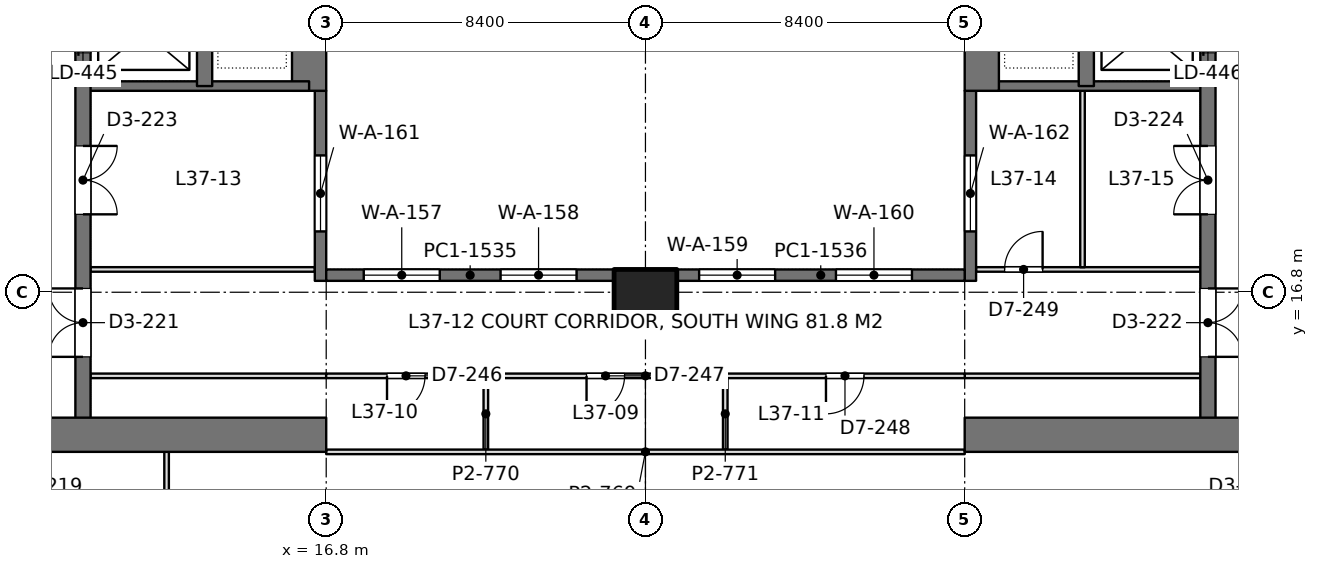
"""IFC4 building model, lengths in metres.
Left out: names, types, materials, properties, quantities, classifications, styles, units other than length and angle.
Written with IfcOpenShell. Run it as: python <this file> out.ifc"""

import sys

from ifc_helpers import new_model, si_unit, direction, frame, frame_2d, origin, origin_2d, place, context, subcontext, project, spatial, rectangle, extrude, element, fill, save


model = new_model("IFC4")
c1 = context("Model", 3, precision=1e-05, world=origin(), true_north=direction((0.0, 1.0)))
c2 = subcontext(c1, "Body", "Model", "MODEL_VIEW")
j1 = project(units=[si_unit("LENGTHUNIT", "METRE"), si_unit("PLANEANGLEUNIT", "RADIAN")], contexts=[c1])
p1 = place(None, origin())
s1 = spatial("IfcSite", under=j1, at=p1, CompositionType="ELEMENT")
p2 = place(p1, origin())
s2 = spatial("IfcBuilding", under=s1, at=p2, CompositionType="ELEMENT")
p3 = place(p2, frame((0.0, 0.0, 163.8)))
s3 = spatial("IfcBuildingStorey", under=s2, at=p3, CompositionType="ELEMENT", Elevation=163.8)
p4 = place(p3, frame((25.2, 16.8, 0.0), z_axis=(0.0, 0.0, 1.0), x_axis=(1.0, 0.0, 0.0)))
e1 = element("IfcColumn", 1, at=p4, inside=s3, PredefinedType="COLUMN", context=c2, shape_type="SweptSolid", body=[
    extrude(rectangle(XDim=1.65, YDim=1.2, at=origin_2d()), origin(), (0.0, 0.0, 1.0), 4.2),
])
p5 = place(p3, frame((-1.2, 13.05, 0.0), z_axis=(0.0, 0.0, 1.0), x_axis=(1.0, 0.0, 0.0)))
e2 = element("IfcWall", 2, at=p5, inside=s3, PredefinedType="SHEAR", context=c2, shape_type="SweptSolid", body=[
    extrude(rectangle(XDim=18.0, YDim=0.9, at=frame_2d((9.0, 0.0))), origin(), (0.0, 0.0, 1.0), 4.2),
])
p6 = place(p5, frame((8.95, 0.0, 0.0)))
e3 = element("IfcOpeningElement", 3, at=p6, cuts=e2, PredefinedType="OPENING", context=c2, shape_type="SweptSolid", body=[
    extrude(rectangle(XDim=1.8, YDim=2.4, at=frame_2d((0.9, 1.2))), frame((0.0, 0.46, 0.0), z_axis=(0.0, -1.0, 0.0), x_axis=(1.0, 0.0, 0.0)), (0.0, 0.0, 1.0), 0.92),
])
p7 = place(p3, frame((16.35, 22.1, 0.0), z_axis=(0.0, 0.0, 1.0), x_axis=(0.0, 1.0, 0.0)))
e4 = element("IfcWall", 4, at=p7, inside=s3, PredefinedType="SHEAR", context=c2, shape_type="SweptSolid", body=[
    extrude(rectangle(XDim=15.25, YDim=0.9, at=frame_2d((7.625, 0.0))), origin(), (0.0, 0.0, 1.0), 4.2),
])
p8 = place(p3, frame((10.4, 13.05, 0.0), z_axis=(0.0, 0.0, 1.0), x_axis=(0.0, 1.0, 0.0)))
e5 = element("IfcWall", 5, at=p8, inside=s3, PredefinedType="SHEAR", context=c2, shape_type="SweptSolid", body=[
    extrude(rectangle(XDim=24.3, YDim=0.4, at=frame_2d((12.15, 0.0))), origin(), (0.0, 0.0, 1.0), 4.2),
])
p9 = place(p8, frame((10.05, 0.0, 0.0)))
e6 = element("IfcOpeningElement", 6, at=p9, cuts=e5, PredefinedType="OPENING", context=c2, shape_type="SweptSolid", body=[
    extrude(rectangle(XDim=1.1, YDim=2.2, at=frame_2d((0.55, 1.1))), frame((0.0, 0.21, 0.0), z_axis=(0.0, -1.0, 0.0), x_axis=(1.0, 0.0, 0.0)), (0.0, 0.0, 1.0), 0.42),
])
p10 = place(p8, frame((12.9, 0.0, 0.0)))
e7 = element("IfcOpeningElement", 7, at=p10, cuts=e5, PredefinedType="OPENING", context=c2, shape_type="SweptSolid", body=[
    extrude(rectangle(XDim=1.1, YDim=2.2, at=frame_2d((0.55, 1.1))), frame((0.0, 0.21, 0.0), z_axis=(0.0, -1.0, 0.0), x_axis=(1.0, 0.0, 0.0)), (0.0, 0.0, 1.0), 0.42),
])
p11 = place(p8, frame((21.45, 0.0, 0.0)))
e8 = element("IfcOpeningElement", 8, at=p11, cuts=e5, PredefinedType="OPENING", context=c2, shape_type="SweptSolid", body=[
    extrude(rectangle(XDim=1.1, YDim=2.2, at=frame_2d((0.55, 1.1))), frame((0.0, 0.21, 0.0), z_axis=(0.0, -1.0, 0.0), x_axis=(1.0, 0.0, 0.0)), (0.0, 0.0, 1.0), 0.42),
])
p12 = place(p8, frame((2.05, 0.0, 0.0)))
e9 = element("IfcOpeningElement", 9, at=p12, cuts=e5, PredefinedType="OPENING", context=c2, shape_type="SweptSolid", body=[
    extrude(rectangle(XDim=1.8, YDim=2.4, at=frame_2d((0.9, 1.2))), frame((0.0, 0.21, 0.0), z_axis=(0.0, -1.0, 0.0), x_axis=(1.0, 0.0, 0.0)), (0.0, 0.0, 1.0), 0.42),
])
p13 = place(p8, frame((5.8, 0.0, 0.0)))
e10 = element("IfcOpeningElement", 10, at=p13, cuts=e5, PredefinedType="OPENING", context=c2, shape_type="SweptSolid", body=[
    extrude(rectangle(XDim=1.8, YDim=2.4, at=frame_2d((0.9, 1.2))), frame((0.0, 0.21, 0.0), z_axis=(0.0, -1.0, 0.0), x_axis=(1.0, 0.0, 0.0)), (0.0, 0.0, 1.0), 0.42),
])
p14 = place(p3, frame((13.6, 22.225, 0.0), z_axis=(0.0, 0.0, 1.0), x_axis=(0.0, 1.0, 0.0)))
e11 = element("IfcWall", 11, at=p14, inside=s3, PredefinedType="SHEAR", context=c2, shape_type="SweptSolid", body=[
    extrude(rectangle(XDim=15.125, YDim=0.4, at=frame_2d((7.562, 0.0))), origin(), (0.0, 0.0, 1.0), 4.2),
])
p15 = place(p3, frame((10.4, 22.225, 0.0), z_axis=(0.0, 0.0, 1.0), x_axis=(1.0, 0.0, 0.0)))
e12 = element("IfcWall", 12, at=p15, inside=s3, PredefinedType="SHEAR", context=c2, shape_type="SweptSolid", body=[
    extrude(rectangle(XDim=5.95, YDim=0.25, at=frame_2d((2.975, 0.0))), origin(), (0.0, 0.0, 1.0), 4.2),
])
p16 = place(p3, frame((33.6, 13.05, 0.0), z_axis=(0.0, 0.0, 1.0), x_axis=(1.0, 0.0, 0.0)))
e13 = element("IfcWall", 13, at=p16, inside=s3, PredefinedType="SHEAR", context=c2, shape_type="SweptSolid", body=[
    extrude(rectangle(XDim=18.0, YDim=0.9, at=frame_2d((9.0, 0.0))), origin(), (0.0, 0.0, 1.0), 4.2),
])
p17 = place(p16, frame((7.25, 0.0, 0.0)))
e14 = element("IfcOpeningElement", 14, at=p17, cuts=e13, PredefinedType="OPENING", context=c2, shape_type="SweptSolid", body=[
    extrude(rectangle(XDim=1.8, YDim=2.4, at=frame_2d((0.9, 1.2))), frame((0.0, 0.46, 0.0), z_axis=(0.0, -1.0, 0.0), x_axis=(1.0, 0.0, 0.0)), (0.0, 0.0, 1.0), 0.92),
])
p18 = place(p3, frame((34.05, 22.1, 0.0), z_axis=(0.0, 0.0, 1.0), x_axis=(0.0, 1.0, 0.0)))
e15 = element("IfcWall", 15, at=p18, inside=s3, PredefinedType="SHEAR", context=c2, shape_type="SweptSolid", body=[
    extrude(rectangle(XDim=15.25, YDim=0.9, at=frame_2d((7.625, 0.0))), origin(), (0.0, 0.0, 1.0), 4.2),
])
p19 = place(p3, frame((40.0, 13.05, 0.0), z_axis=(0.0, 0.0, 1.0), x_axis=(0.0, 1.0, 0.0)))
e16 = element("IfcWall", 16, at=p19, inside=s3, PredefinedType="SHEAR", context=c2, shape_type="SweptSolid", body=[
    extrude(rectangle(XDim=24.3, YDim=0.4, at=frame_2d((12.15, 0.0))), origin(), (0.0, 0.0, 1.0), 4.2),
])
p20 = place(p19, frame((10.05, 0.0, 0.0)))
e17 = element("IfcOpeningElement", 17, at=p20, cuts=e16, PredefinedType="OPENING", context=c2, shape_type="SweptSolid", body=[
    extrude(rectangle(XDim=1.1, YDim=2.2, at=frame_2d((0.55, 1.1))), frame((0.0, 0.21, 0.0), z_axis=(0.0, -1.0, 0.0), x_axis=(1.0, 0.0, 0.0)), (0.0, 0.0, 1.0), 0.42),
])
p21 = place(p19, frame((12.9, 0.0, 0.0)))
e18 = element("IfcOpeningElement", 18, at=p21, cuts=e16, PredefinedType="OPENING", context=c2, shape_type="SweptSolid", body=[
    extrude(rectangle(XDim=1.1, YDim=2.2, at=frame_2d((0.55, 1.1))), frame((0.0, 0.21, 0.0), z_axis=(0.0, -1.0, 0.0), x_axis=(1.0, 0.0, 0.0)), (0.0, 0.0, 1.0), 0.42),
])
p22 = place(p19, frame((21.45, 0.0, 0.0)))
e19 = element("IfcOpeningElement", 19, at=p22, cuts=e16, PredefinedType="OPENING", context=c2, shape_type="SweptSolid", body=[
    extrude(rectangle(XDim=1.1, YDim=2.2, at=frame_2d((0.55, 1.1))), frame((0.0, 0.21, 0.0), z_axis=(0.0, -1.0, 0.0), x_axis=(1.0, 0.0, 0.0)), (0.0, 0.0, 1.0), 0.42),
])
p23 = place(p19, frame((2.05, 0.0, 0.0)))
e20 = element("IfcOpeningElement", 20, at=p23, cuts=e16, PredefinedType="OPENING", context=c2, shape_type="SweptSolid", body=[
    extrude(rectangle(XDim=1.8, YDim=2.4, at=frame_2d((0.9, 1.2))), frame((0.0, 0.21, 0.0), z_axis=(0.0, -1.0, 0.0), x_axis=(1.0, 0.0, 0.0)), (0.0, 0.0, 1.0), 0.42),
])
p24 = place(p19, frame((5.8, 0.0, 0.0)))
e21 = element("IfcOpeningElement", 21, at=p24, cuts=e16, PredefinedType="OPENING", context=c2, shape_type="SweptSolid", body=[
    extrude(rectangle(XDim=1.8, YDim=2.4, at=frame_2d((0.9, 1.2))), frame((0.0, 0.21, 0.0), z_axis=(0.0, -1.0, 0.0), x_axis=(1.0, 0.0, 0.0)), (0.0, 0.0, 1.0), 0.42),
])
p25 = place(p3, frame((36.8, 22.225, 0.0), z_axis=(0.0, 0.0, 1.0), x_axis=(0.0, 1.0, 0.0)))
e22 = element("IfcWall", 22, at=p25, inside=s3, PredefinedType="SHEAR", context=c2, shape_type="SweptSolid", body=[
    extrude(rectangle(XDim=15.125, YDim=0.4, at=frame_2d((7.562, 0.0))), origin(), (0.0, 0.0, 1.0), 4.2),
])
p26 = place(p3, frame((40.0, 22.225, 0.0), z_axis=(0.0, 0.0, 1.0), x_axis=(-1.0, 0.0, 0.0)))
e23 = element("IfcWall", 23, at=p26, inside=s3, PredefinedType="SHEAR", context=c2, shape_type="SweptSolid", body=[
    extrude(rectangle(XDim=5.95, YDim=0.25, at=frame_2d((2.975, 0.0))), origin(), (0.0, 0.0, 1.0), 4.2),
])
p27 = place(p3, frame((16.65, 17.1, 0.0), z_axis=(0.0, 0.0, 1.0), x_axis=(0.0, 1.0, 0.0)))
e24 = element("IfcWall", 24, at=p27, inside=s3, PredefinedType="SOLIDWALL", context=c2, shape_type="SweptSolid", body=[
    extrude(rectangle(XDim=5.0, YDim=0.3, at=frame_2d((2.5, 0.0))), origin(), (0.0, 0.0, 1.0), 4.0),
])
p28 = place(p27, frame((1.3, 0.0, 0.1)))
e25 = element("IfcOpeningElement", 25, at=p28, cuts=e24, PredefinedType="OPENING", context=c2, shape_type="SweptSolid", body=[
    extrude(rectangle(XDim=2.0, YDim=3.0, at=frame_2d((1.0, 1.5))), frame((0.0, 0.16, 0.0), z_axis=(0.0, -1.0, 0.0), x_axis=(1.0, 0.0, 0.0)), (0.0, 0.0, 1.0), 0.32),
])
p29 = place(p3, frame((33.75, 17.1, 0.0), z_axis=(0.0, 0.0, 1.0), x_axis=(0.0, 1.0, 0.0)))
e26 = element("IfcWall", 26, at=p29, inside=s3, PredefinedType="SOLIDWALL", context=c2, shape_type="SweptSolid", body=[
    extrude(rectangle(XDim=5.0, YDim=0.3, at=frame_2d((2.5, 0.0))), origin(), (0.0, 0.0, 1.0), 4.0),
])
p30 = place(p29, frame((1.3, 0.0, 0.1)))
e27 = element("IfcOpeningElement", 27, at=p30, cuts=e26, PredefinedType="OPENING", context=c2, shape_type="SweptSolid", body=[
    extrude(rectangle(XDim=2.0, YDim=3.0, at=frame_2d((1.0, 1.5))), frame((0.0, 0.16, 0.0), z_axis=(0.0, -1.0, 0.0), x_axis=(1.0, 0.0, 0.0)), (0.0, 0.0, 1.0), 0.32),
])
p31 = place(p3, frame((16.8, 17.25, 0.0), z_axis=(0.0, 0.0, 1.0), x_axis=(1.0, 0.0, 0.0)))
e28 = element("IfcWall", 28, at=p31, inside=s3, PredefinedType="SOLIDWALL", context=c2, shape_type="SweptSolid", body=[
    extrude(rectangle(XDim=7.575, YDim=0.3, at=frame_2d((3.788, 0.0))), origin(), (0.0, 0.0, 1.0), 4.0),
])
p32 = place(p31, frame((0.988, 0.0, 0.1)))
e29 = element("IfcOpeningElement", 29, at=p32, cuts=e28, PredefinedType="OPENING", context=c2, shape_type="SweptSolid", body=[
    extrude(rectangle(XDim=2.0, YDim=3.0, at=frame_2d((1.0, 1.5))), frame((0.0, 0.16, 0.0), z_axis=(0.0, -1.0, 0.0), x_axis=(1.0, 0.0, 0.0)), (0.0, 0.0, 1.0), 0.32),
])
p33 = place(p31, frame((4.587, 0.0, 0.1)))
e30 = element("IfcOpeningElement", 30, at=p33, cuts=e28, PredefinedType="OPENING", context=c2, shape_type="SweptSolid", body=[
    extrude(rectangle(XDim=2.0, YDim=3.0, at=frame_2d((1.0, 1.5))), frame((0.0, 0.16, 0.0), z_axis=(0.0, -1.0, 0.0), x_axis=(1.0, 0.0, 0.0)), (0.0, 0.0, 1.0), 0.32),
])
p34 = place(p3, frame((26.025, 17.25, 0.0), z_axis=(0.0, 0.0, 1.0), x_axis=(1.0, 0.0, 0.0)))
e31 = element("IfcWall", 31, at=p34, inside=s3, PredefinedType="SOLIDWALL", context=c2, shape_type="SweptSolid", body=[
    extrude(rectangle(XDim=7.575, YDim=0.3, at=frame_2d((3.788, 0.0))), origin(), (0.0, 0.0, 1.0), 4.0),
])
p35 = place(p34, frame((0.587, 0.0, 0.1)))
e32 = element("IfcOpeningElement", 32, at=p35, cuts=e31, PredefinedType="OPENING", context=c2, shape_type="SweptSolid", body=[
    extrude(rectangle(XDim=2.0, YDim=3.0, at=frame_2d((1.0, 1.5))), frame((0.0, 0.16, 0.0), z_axis=(0.0, -1.0, 0.0), x_axis=(1.0, 0.0, 0.0)), (0.0, 0.0, 1.0), 0.32),
])
p36 = place(p34, frame((4.188, 0.0, 0.1)))
e33 = element("IfcOpeningElement", 33, at=p36, cuts=e31, PredefinedType="OPENING", context=c2, shape_type="SweptSolid", body=[
    extrude(rectangle(XDim=2.0, YDim=3.0, at=frame_2d((1.0, 1.5))), frame((0.0, 0.16, 0.0), z_axis=(0.0, -1.0, 0.0), x_axis=(1.0, 0.0, 0.0)), (0.0, 0.0, 1.0), 0.32),
])
p37 = place(p3, frame((10.598, 17.4, 0.0), z_axis=(0.0, 0.0, 1.0), x_axis=(1.0, 0.0, 0.0)))
e34 = element("IfcWall", 34, at=p37, inside=s3, PredefinedType="PARTITIONING", context=c2, shape_type="SweptSolid", body=[
    extrude(rectangle(XDim=5.904, YDim=0.12, at=frame_2d((2.952, 0.0))), origin(), (0.0, 0.0, 1.0), 3.3),
])
p38 = place(p3, frame((33.898, 17.4, 0.0), z_axis=(0.0, 0.0, 1.0), x_axis=(1.0, 0.0, 0.0)))
e35 = element("IfcWall", 35, at=p38, inside=s3, PredefinedType="PARTITIONING", context=c2, shape_type="SweptSolid", body=[
    extrude(rectangle(XDim=5.904, YDim=0.12, at=frame_2d((2.952, 0.0))), origin(), (0.0, 0.0, 1.0), 3.3),
])
p39 = place(p38, frame((0.752, 0.0, 0.0)))
e36 = element("IfcOpeningElement", 36, at=p39, cuts=e35, PredefinedType="OPENING", context=c2, shape_type="SweptSolid", body=[
    extrude(rectangle(XDim=1.0, YDim=2.4, at=frame_2d((0.5, 1.2))), frame((0.0, 0.07, 0.0), z_axis=(0.0, -1.0, 0.0), x_axis=(1.0, 0.0, 0.0)), (0.0, 0.0, 1.0), 0.14),
])
p40 = place(p3, frame((36.7, 17.458, 0.0), z_axis=(0.0, 0.0, 1.0), x_axis=(0.0, 1.0, 0.0)))
e37 = element("IfcWall", 37, at=p40, inside=s3, PredefinedType="PARTITIONING", context=c2, shape_type="SweptSolid", body=[
    extrude(rectangle(XDim=4.644, YDim=0.12, at=frame_2d((2.322, 0.0))), origin(), (0.0, 0.0, 1.0), 3.4),
])
p41 = place(p3, frame((12.6, 1.898, 0.0), z_axis=(0.0, 0.0, 1.0), x_axis=(0.0, 1.0, 0.0)))
e38 = element("IfcWall", 38, at=p41, inside=s3, PredefinedType="PARTITIONING", context=c2, shape_type="SweptSolid", body=[
    extrude(rectangle(XDim=10.704, YDim=0.12, at=frame_2d((5.352, 0.0))), origin(), (0.0, 0.0, 1.0), 3.3),
])
for number, where, z_axis, x_axis in (
    (39, (10.598, 14.6, 0.0), (0.0, 0.0, 1.0), (1.0, 0.0, 0.0)),
    (40, (33.598, 14.6, 0.0), (0.0, 0.0, 1.0), (1.0, 0.0, 0.0)),
):
    element("IfcWall", number, at=place(p3, frame(where, z_axis=z_axis, x_axis=x_axis)), inside=s3, PredefinedType="PARTITIONING", context=c2, shape_type="SweptSolid", body=[
        extrude(rectangle(XDim=6.204, YDim=0.12, at=frame_2d((3.102, 0.0))), origin(), (0.0, 0.0, 1.0), 3.3),
    ])
for number, where, z_axis, x_axis in (
    (41, (21.0, 12.658, 0.0), (0.0, 0.0, 1.0), (0.0, 1.0, 0.0)),
    (42, (27.3, 12.658, 0.0), (0.0, 0.0, 1.0), (0.0, 1.0, 0.0)),
):
    element("IfcWall", number, at=place(p3, frame(where, z_axis=z_axis, x_axis=x_axis)), inside=s3, PredefinedType="PARTITIONING", context=c2, shape_type="SweptSolid", body=[
        extrude(rectangle(XDim=1.884, YDim=0.12, at=frame_2d((0.942, 0.0))), origin(), (0.0, 0.0, 1.0), 4.0),
    ])
p42 = place(p3, frame((16.798, 14.6, 0.0), z_axis=(0.0, 0.0, 1.0), x_axis=(1.0, 0.0, 0.0)))
e43 = element("IfcWall", 43, at=p42, inside=s3, PredefinedType="PARTITIONING", context=c2, shape_type="SweptSolid", body=[
    extrude(rectangle(XDim=16.804, YDim=0.12, at=frame_2d((8.402, 0.0))), origin(), (0.0, 0.0, 1.0), 3.3),
])
p43 = place(p42, frame((1.602, 0.0, 0.0)))
e44 = element("IfcOpeningElement", 44, at=p43, cuts=e43, PredefinedType="OPENING", context=c2, shape_type="SweptSolid", body=[
    extrude(rectangle(XDim=1.0, YDim=2.4, at=frame_2d((0.5, 1.2))), frame((0.0, 0.07, 0.0), z_axis=(0.0, -1.0, 0.0), x_axis=(1.0, 0.0, 0.0)), (0.0, 0.0, 1.0), 0.14),
])
p44 = place(p42, frame((6.852, 0.0, 0.0)))
e45 = element("IfcOpeningElement", 45, at=p44, cuts=e43, PredefinedType="OPENING", context=c2, shape_type="SweptSolid", body=[
    extrude(rectangle(XDim=1.0, YDim=2.4, at=frame_2d((0.5, 1.2))), frame((0.0, 0.07, 0.0), z_axis=(0.0, -1.0, 0.0), x_axis=(1.0, 0.0, 0.0)), (0.0, 0.0, 1.0), 0.14),
])
p45 = place(p42, frame((13.152, 0.0, 0.0)))
e46 = element("IfcOpeningElement", 46, at=p45, cuts=e43, PredefinedType="OPENING", context=c2, shape_type="SweptSolid", body=[
    extrude(rectangle(XDim=1.0, YDim=2.4, at=frame_2d((0.5, 1.2))), frame((0.0, 0.07, 0.0), z_axis=(0.0, -1.0, 0.0), x_axis=(1.0, 0.0, 0.0)), (0.0, 0.0, 1.0), 0.14),
])
p46 = place(p3, frame((16.8, 12.6, 0.0), z_axis=(0.0, 0.0, 1.0), x_axis=(1.0, 0.0, 0.0)))
e47 = element("IfcWall", 47, at=p46, inside=s3, PredefinedType="PARTITIONING", context=c2, shape_type="SweptSolid", body=[
    extrude(rectangle(XDim=16.8, YDim=0.12, at=frame_2d((8.4, 0.0))), origin(), (0.0, 0.0, 1.0), 3.3),
])
p47 = place(p28, origin())
e48 = element("IfcWindow", 48, at=p47, inside=s3, PartitioningType="SINGLE_PANEL", PredefinedType="WINDOW", context=c2, shape_type="SweptSolid", body=[
    extrude(rectangle(XDim=2.0, YDim=3.0, at=frame_2d((1.0, 1.5))), frame((0.0, 0.03, 0.0), z_axis=(0.0, -1.0, 0.0), x_axis=(1.0, 0.0, 0.0)), (0.0, 0.0, 1.0), 0.06),
])
fill(e25, e48)
p48 = place(p30, origin())
e49 = element("IfcWindow", 49, at=p48, inside=s3, PartitioningType="SINGLE_PANEL", PredefinedType="WINDOW", context=c2, shape_type="SweptSolid", body=[
    extrude(rectangle(XDim=2.0, YDim=3.0, at=frame_2d((1.0, 1.5))), frame((0.0, 0.03, 0.0), z_axis=(0.0, -1.0, 0.0), x_axis=(1.0, 0.0, 0.0)), (0.0, 0.0, 1.0), 0.06),
])
fill(e27, e49)
p49 = place(p32, origin())
e50 = element("IfcWindow", 50, at=p49, inside=s3, PartitioningType="SINGLE_PANEL", PredefinedType="WINDOW", context=c2, shape_type="SweptSolid", body=[
    extrude(rectangle(XDim=2.0, YDim=3.0, at=frame_2d((1.0, 1.5))), frame((0.0, 0.03, 0.0), z_axis=(0.0, -1.0, 0.0), x_axis=(1.0, 0.0, 0.0)), (0.0, 0.0, 1.0), 0.06),
])
fill(e29, e50)
p50 = place(p33, origin())
e51 = element("IfcWindow", 51, at=p50, inside=s3, PartitioningType="SINGLE_PANEL", PredefinedType="WINDOW", context=c2, shape_type="SweptSolid", body=[
    extrude(rectangle(XDim=2.0, YDim=3.0, at=frame_2d((1.0, 1.5))), frame((0.0, 0.03, 0.0), z_axis=(0.0, -1.0, 0.0), x_axis=(1.0, 0.0, 0.0)), (0.0, 0.0, 1.0), 0.06),
])
fill(e30, e51)
p51 = place(p35, origin())
e52 = element("IfcWindow", 52, at=p51, inside=s3, PartitioningType="SINGLE_PANEL", PredefinedType="WINDOW", context=c2, shape_type="SweptSolid", body=[
    extrude(rectangle(XDim=2.0, YDim=3.0, at=frame_2d((1.0, 1.5))), frame((0.0, 0.03, 0.0), z_axis=(0.0, -1.0, 0.0), x_axis=(1.0, 0.0, 0.0)), (0.0, 0.0, 1.0), 0.06),
])
fill(e32, e52)
p52 = place(p36, origin())
e53 = element("IfcWindow", 53, at=p52, inside=s3, PartitioningType="SINGLE_PANEL", PredefinedType="WINDOW", context=c2, shape_type="SweptSolid", body=[
    extrude(rectangle(XDim=2.0, YDim=3.0, at=frame_2d((1.0, 1.5))), frame((0.0, 0.03, 0.0), z_axis=(0.0, -1.0, 0.0), x_axis=(1.0, 0.0, 0.0)), (0.0, 0.0, 1.0), 0.06),
])
fill(e33, e53)
p53 = place(p12, origin())
e54 = element("IfcDoor", 54, at=p53, inside=s3, OperationType="DOUBLE_DOOR_SINGLE_SWING", PredefinedType="DOOR", context=c2, shape_type="SweptSolid", body=[
    extrude(rectangle(XDim=1.8, YDim=2.4, at=frame_2d((0.9, 1.2))), frame((0.0, 0.025, 0.0), z_axis=(0.0, -1.0, 0.0), x_axis=(1.0, 0.0, 0.0)), (0.0, 0.0, 1.0), 0.05),
])
fill(e9, e54)
p54 = place(p13, frame((1.8, 0.0, 0.0), z_axis=(0.0, 0.0, 1.0), x_axis=(-1.0, 0.0, 0.0)))
e55 = element("IfcDoor", 55, at=p54, inside=s3, OperationType="DOUBLE_DOOR_SINGLE_SWING", PredefinedType="DOOR", context=c2, shape_type="SweptSolid", body=[
    extrude(rectangle(XDim=1.8, YDim=2.4, at=frame_2d((0.9, 1.2))), frame((0.0, 0.025, 0.0), z_axis=(0.0, -1.0, 0.0), x_axis=(1.0, 0.0, 0.0)), (0.0, 0.0, 1.0), 0.05),
])
fill(e10, e55)
p55 = place(p23, frame((1.8, 0.0, 0.0), z_axis=(0.0, 0.0, 1.0), x_axis=(-1.0, 0.0, 0.0)))
e56 = element("IfcDoor", 56, at=p55, inside=s3, OperationType="DOUBLE_DOOR_SINGLE_SWING", PredefinedType="DOOR", context=c2, shape_type="SweptSolid", body=[
    extrude(rectangle(XDim=1.8, YDim=2.4, at=frame_2d((0.9, 1.2))), frame((0.0, 0.025, 0.0), z_axis=(0.0, -1.0, 0.0), x_axis=(1.0, 0.0, 0.0)), (0.0, 0.0, 1.0), 0.05),
])
fill(e20, e56)
p56 = place(p24, origin())
e57 = element("IfcDoor", 57, at=p56, inside=s3, OperationType="DOUBLE_DOOR_SINGLE_SWING", PredefinedType="DOOR", context=c2, shape_type="SweptSolid", body=[
    extrude(rectangle(XDim=1.8, YDim=2.4, at=frame_2d((0.9, 1.2))), frame((0.0, 0.025, 0.0), z_axis=(0.0, -1.0, 0.0), x_axis=(1.0, 0.0, 0.0)), (0.0, 0.0, 1.0), 0.05),
])
fill(e21, e57)
p57 = place(p39, origin())
e58 = element("IfcDoor", 58, at=p57, inside=s3, OperationType="SINGLE_SWING_RIGHT", PredefinedType="DOOR", context=c2, shape_type="SweptSolid", body=[
    extrude(rectangle(XDim=1.0, YDim=2.4, at=frame_2d((0.5, 1.2))), frame((0.0, 0.025, 0.0), z_axis=(0.0, -1.0, 0.0), x_axis=(1.0, 0.0, 0.0)), (0.0, 0.0, 1.0), 0.05),
])
fill(e36, e58)
p58 = place(p43, frame((1.0, 0.0, 0.0), z_axis=(0.0, 0.0, 1.0), x_axis=(-1.0, 0.0, 0.0)))
e59 = element("IfcDoor", 59, at=p58, inside=s3, OperationType="SINGLE_SWING_RIGHT", PredefinedType="DOOR", context=c2, shape_type="SweptSolid", body=[
    extrude(rectangle(XDim=1.0, YDim=2.4, at=frame_2d((0.5, 1.2))), frame((0.0, 0.025, 0.0), z_axis=(0.0, -1.0, 0.0), x_axis=(1.0, 0.0, 0.0)), (0.0, 0.0, 1.0), 0.05),
])
fill(e44, e59)
p59 = place(p44, frame((1.0, 0.0, 0.0), z_axis=(0.0, 0.0, 1.0), x_axis=(-1.0, 0.0, 0.0)))
e60 = element("IfcDoor", 60, at=p59, inside=s3, OperationType="SINGLE_SWING_RIGHT", PredefinedType="DOOR", context=c2, shape_type="SweptSolid", body=[
    extrude(rectangle(XDim=1.0, YDim=2.4, at=frame_2d((0.5, 1.2))), frame((0.0, 0.025, 0.0), z_axis=(0.0, -1.0, 0.0), x_axis=(1.0, 0.0, 0.0)), (0.0, 0.0, 1.0), 0.05),
])
fill(e45, e60)
p60 = place(p45, frame((1.0, 0.0, 0.0), z_axis=(0.0, 0.0, 1.0), x_axis=(-1.0, 0.0, 0.0)))
e61 = element("IfcDoor", 61, at=p60, inside=s3, OperationType="SINGLE_SWING_RIGHT", PredefinedType="DOOR", context=c2, shape_type="SweptSolid", body=[
    extrude(rectangle(XDim=1.0, YDim=2.4, at=frame_2d((0.5, 1.2))), frame((0.0, 0.025, 0.0), z_axis=(0.0, -1.0, 0.0), x_axis=(1.0, 0.0, 0.0)), (0.0, 0.0, 1.0), 0.05),
])
fill(e46, e61)
save(model, sys.argv[1])
